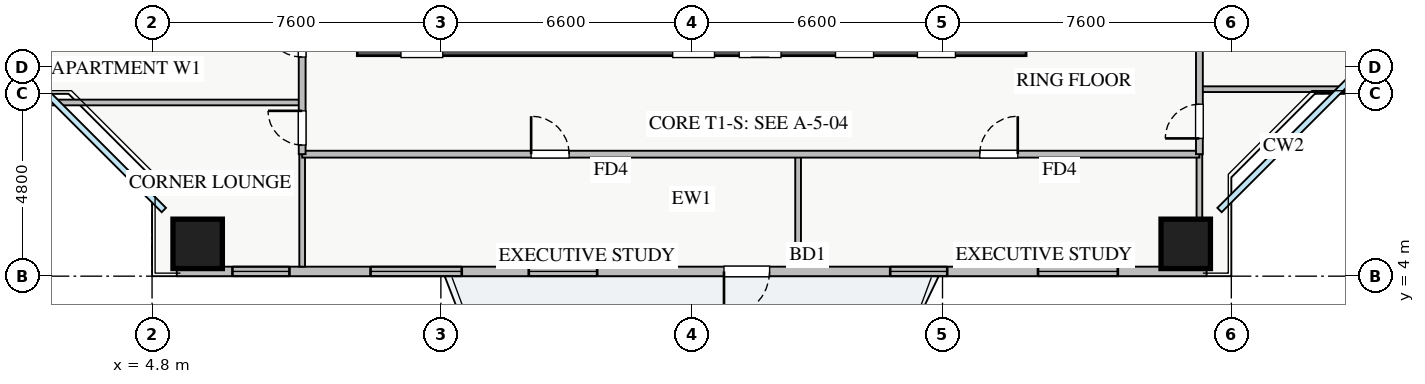
"""IFC4 building model, lengths in metres.
Left out: names, types, materials, properties, quantities, classifications, styles, units other than length and angle.
Written with IfcOpenShell. Run it as: python <this file> out.ifc"""

import sys

from ifc_helpers import new_model, si_unit, direction, frame, frame_2d, origin, origin_2d, place, context, subcontext, project, spatial, rectangle, extrude, source, transform, mapped, element, fill, save


model = new_model("IFC4")
c1 = context("Model", 3, precision=1e-05, world=origin(), true_north=direction((0.0, 1.0)))
c2 = subcontext(c1, "Body", "Model", "MODEL_VIEW")
j1 = project(units=[si_unit("LENGTHUNIT", "METRE"), si_unit("PLANEANGLEUNIT", "RADIAN")], contexts=[c1])
p1 = place(None, origin())
s1 = spatial("IfcSite", under=j1, at=p1, CompositionType="ELEMENT")
p2 = place(p1, origin())
s2 = spatial("IfcBuilding", under=s1, at=p2, CompositionType="ELEMENT")
p3 = place(p2, frame((0.0, 0.0, 60.0)))
s3 = spatial("IfcBuildingStorey", under=s2, at=p3, CompositionType="ELEMENT", Elevation=60.0)
p4 = place(p3, frame((10.2, 10.2, 0.0), z_axis=(0.0, 0.0, 1.0), x_axis=(1.0, 0.0, 0.0)))
e1 = element("IfcWall", 1, at=p4, inside=s3, PredefinedType="SHEAR", context=c2, shape_type="SweptSolid", body=[
    extrude(rectangle(XDim=17.6, YDim=0.8, at=frame_2d((8.8, 0.0))), origin(), (0.0, 0.0, 1.0), 3.25),
])
p5 = place(p4, frame((1.15, 0.0, 0.0)))
e2 = element("IfcOpeningElement", 2, at=p5, cuts=e1, PredefinedType="OPENING", context=c2, shape_type="SweptSolid", body=[
    extrude(rectangle(XDim=1.1, YDim=2.05, at=frame_2d((0.55, 1.025))), frame((0.0, 0.41, 0.0), z_axis=(0.0, -1.0, 0.0), x_axis=(1.0, 0.0, 0.0)), (0.0, 0.0, 1.0), 0.82),
])
p6 = place(p4, frame((8.3, 0.0, 0.0)))
e3 = element("IfcOpeningElement", 3, at=p6, cuts=e1, PredefinedType="OPENING", context=c2, shape_type="SweptSolid", body=[
    extrude(rectangle(XDim=1.1, YDim=2.05, at=frame_2d((0.55, 1.025))), frame((0.0, 0.41, 0.0), z_axis=(0.0, -1.0, 0.0), x_axis=(1.0, 0.0, 0.0)), (0.0, 0.0, 1.0), 0.82),
])
p7 = place(p4, frame((10.05, 0.0, 0.0)))
e4 = element("IfcOpeningElement", 4, at=p7, cuts=e1, PredefinedType="OPENING", context=c2, shape_type="SweptSolid", body=[
    extrude(rectangle(XDim=1.1, YDim=2.05, at=frame_2d((0.55, 1.025))), frame((0.0, 0.41, 0.0), z_axis=(0.0, -1.0, 0.0), x_axis=(1.0, 0.0, 0.0)), (0.0, 0.0, 1.0), 0.82),
])
p8 = place(p4, frame((14.74, 0.0, 0.0)))
e5 = element("IfcOpeningElement", 5, at=p8, cuts=e1, PredefinedType="OPENING", context=c2, shape_type="SweptSolid", body=[
    extrude(rectangle(XDim=1.0, YDim=2.05, at=frame_2d((0.5, 1.025))), frame((0.0, 0.41, 0.0), z_axis=(0.0, -1.0, 0.0), x_axis=(1.0, 0.0, 0.0)), (0.0, 0.0, 1.0), 0.82),
])
p9 = place(p4, frame((12.585, 0.0, 0.0)))
e6 = element("IfcOpeningElement", 6, at=p9, cuts=e1, PredefinedType="OPENING", context=c2, shape_type="SweptSolid", body=[
    extrude(rectangle(XDim=1.0, YDim=2.05, at=frame_2d((0.5, 1.025))), frame((0.0, 0.41, 0.0), z_axis=(0.0, -1.0, 0.0), x_axis=(1.0, 0.0, 0.0)), (0.0, 0.0, 1.0), 0.82),
])
m1 = source(origin(), c2, "Body", "SweptSolid", [
    extrude(rectangle(XDim=1.3, YDim=1.3, at=origin_2d()), origin(), (0.0, 0.0, 1.0), 3.25),
])
for number, where, z_axis, x_axis in (
    (7, (6.0, 4.85, 0.0), (0.0, 0.0, 1.0), (1.0, 0.0, 0.0)),
    (8, (32.0, 4.85, 0.0), (0.0, 0.0, 1.0), (1.0, 0.0, 0.0)),
):
    element("IfcColumn", number, at=place(p3, frame(where, z_axis=z_axis, x_axis=x_axis)), inside=s3, PredefinedType="COLUMN", context=c2, shape_type="MappedRepresentation", body=[
        mapped(m1, transform((0.0, 0.0, 0.0), x_axis=(1.0, 0.0, 0.0), y_axis=(0.0, 1.0, 0.0), z_axis=(0.0, 0.0, 1.0), scale=1.0)),
    ])
p10 = place(p3, frame((5.45, 4.125, 0.0), z_axis=(0.0, 0.0, 1.0), x_axis=(1.0, 0.0, 0.0)))
e9 = element("IfcWall", 9, at=p10, inside=s3, PredefinedType="STANDARD", context=c2, shape_type="SweptSolid", body=[
    extrude(rectangle(XDim=27.1, YDim=0.25, at=frame_2d((13.55, 0.0))), origin(), (0.0, 0.0, 1.0), 2.61),
])
p11 = place(p10, frame((14.4, 0.0, 0.0)))
e10 = element("IfcOpeningElement", 10, at=p11, cuts=e9, PredefinedType="OPENING", context=c2, shape_type="SweptSolid", body=[
    extrude(rectangle(XDim=1.2, YDim=2.1, at=frame_2d((0.6, 1.05))), frame((0.0, 0.135, 0.0), z_axis=(0.0, -1.0, 0.0), x_axis=(1.0, 0.0, 0.0)), (0.0, 0.0, 1.0), 0.27),
])
p12 = place(p10, frame((1.465, 0.0, 0.9)))
e11 = element("IfcOpeningElement", 11, at=p12, cuts=e9, PredefinedType="OPENING", context=c2, shape_type="SweptSolid", body=[
    extrude(rectangle(XDim=1.5, YDim=1.5, at=frame_2d((0.75, 0.75))), frame((0.0, 0.135, 0.0), z_axis=(0.0, -1.0, 0.0), x_axis=(1.0, 0.0, 0.0)), (0.0, 0.0, 1.0), 0.27),
])
p13 = place(p10, frame((9.263, 0.0, 0.9)))
e12 = element("IfcOpeningElement", 12, at=p13, cuts=e9, PredefinedType="OPENING", context=c2, shape_type="SweptSolid", body=[
    extrude(rectangle(XDim=1.8, YDim=1.45, at=frame_2d((0.9, 0.725))), frame((0.0, 0.135, 0.0), z_axis=(0.0, -1.0, 0.0), x_axis=(1.0, 0.0, 0.0)), (0.0, 0.0, 1.0), 0.27),
])
p14 = place(p10, frame((18.774, 0.0, 0.9)))
e13 = element("IfcOpeningElement", 13, at=p14, cuts=e9, PredefinedType="OPENING", context=c2, shape_type="SweptSolid", body=[
    extrude(rectangle(XDim=1.5, YDim=1.5, at=frame_2d((0.75, 0.75))), frame((0.0, 0.135, 0.0), z_axis=(0.0, -1.0, 0.0), x_axis=(1.0, 0.0, 0.0)), (0.0, 0.0, 1.0), 0.27),
])
p15 = place(p10, frame((22.663, 0.0, 0.9)))
e14 = element("IfcOpeningElement", 14, at=p15, cuts=e9, PredefinedType="OPENING", context=c2, shape_type="SweptSolid", body=[
    extrude(rectangle(XDim=2.1, YDim=1.48, at=frame_2d((1.05, 0.74))), frame((0.0, 0.135, 0.0), z_axis=(0.0, -1.0, 0.0), x_axis=(1.0, 0.0, 0.0)), (0.0, 0.0, 1.0), 0.27),
])
p16 = place(p10, frame((5.099, 0.0, 0.9)))
e15 = element("IfcOpeningElement", 15, at=p16, cuts=e9, PredefinedType="OPENING", context=c2, shape_type="SweptSolid", body=[
    extrude(rectangle(XDim=2.4, YDim=1.5, at=frame_2d((1.2, 0.75))), frame((0.0, 0.135, 0.0), z_axis=(0.0, -1.0, 0.0), x_axis=(1.0, 0.0, 0.0)), (0.0, 0.0, 1.0), 0.27),
])
for number, where, z_axis, x_axis in (
    (16, (21.8, 4.25, 0.0), (0.0, 0.0, 1.0), (0.0, 1.0, 0.0)),
    (17, (8.75, 4.25, 0.0), (0.0, 0.0, 1.0), (0.0, 1.0, 0.0)),
    (18, (32.36, 4.25, 0.0), (0.0, 0.0, 1.0), (0.0, 1.0, 0.0)),
):
    element("IfcWall", number, at=place(p3, frame(where, z_axis=z_axis, x_axis=x_axis)), inside=s3, PredefinedType="PARTITIONING", context=c2, shape_type="SweptSolid", body=[
        extrude(rectangle(XDim=2.96, YDim=0.15, at=frame_2d((1.48, 0.0))), origin(), (0.0, 0.0, 1.0), 3.07),
    ])
p17 = place(p3, frame((8.75, 7.21, 0.0), z_axis=(0.0, 0.0, 1.0), x_axis=(1.0, 0.0, 0.0)))
e19 = element("IfcWall", 19, at=p17, inside=s3, PredefinedType="PARTITIONING", context=c2, shape_type="SweptSolid", body=[
    extrude(rectangle(XDim=23.61, YDim=0.18, at=frame_2d((11.805, 0.0))), origin(), (0.0, 0.0, 1.0), 3.07),
])
p18 = place(p17, frame((6.025, 0.0, 0.0)))
e20 = element("IfcOpeningElement", 20, at=p18, cuts=e19, PredefinedType="OPENING", context=c2, shape_type="SweptSolid", body=[
    extrude(rectangle(XDim=1.0, YDim=2.05, at=frame_2d((0.5, 1.025))), frame((0.0, 0.1, 0.0), z_axis=(0.0, -1.0, 0.0), x_axis=(1.0, 0.0, 0.0)), (0.0, 0.0, 1.0), 0.2),
])
p19 = place(p17, frame((17.83, 0.0, 0.0)))
e21 = element("IfcOpeningElement", 21, at=p19, cuts=e19, PredefinedType="OPENING", context=c2, shape_type="SweptSolid", body=[
    extrude(rectangle(XDim=1.0, YDim=2.05, at=frame_2d((0.5, 1.025))), frame((0.0, 0.1, 0.0), z_axis=(0.0, -1.0, 0.0), x_axis=(1.0, 0.0, 0.0)), (0.0, 0.0, 1.0), 0.2),
])
p20 = place(p3, frame((0.25, 8.57, 0.0), z_axis=(0.0, 0.0, 1.0), x_axis=(1.0, 0.0, 0.0)))
e22 = element("IfcWall", 22, at=p20, inside=s3, PredefinedType="PARTITIONING", context=c2, shape_type="SweptSolid", body=[
    extrude(rectangle(XDim=8.5, YDim=0.15, at=frame_2d((4.25, 0.0))), origin(), (0.0, 0.0, 1.0), 3.07),
])
p21 = place(p3, frame((8.75, 7.21, 0.0), z_axis=(0.0, 0.0, 1.0), x_axis=(0.0, 1.0, 0.0)))
e23 = element("IfcWall", 23, at=p21, inside=s3, PredefinedType="PARTITIONING", context=c2, shape_type="SweptSolid", body=[
    extrude(rectangle(XDim=31.23, YDim=0.18, at=frame_2d((15.615, 0.0))), origin(), (0.0, 0.0, 1.0), 3.07),
])
p22 = place(p21, frame((30.09, 0.0, 0.0)))
e24 = element("IfcOpeningElement", 24, at=p22, cuts=e23, PredefinedType="OPENING", context=c2, shape_type="SweptSolid", body=[
    extrude(rectangle(XDim=0.9, YDim=2.05, at=frame_2d((0.45, 1.025))), frame((0.0, 0.1, 0.0), z_axis=(0.0, -1.0, 0.0), x_axis=(1.0, 0.0, 0.0)), (0.0, 0.0, 1.0), 0.2),
])
p23 = place(p21, frame((0.24, 0.0, 0.0)))
e25 = element("IfcOpeningElement", 25, at=p23, cuts=e23, PredefinedType="OPENING", context=c2, shape_type="SweptSolid", body=[
    extrude(rectangle(XDim=0.9, YDim=2.05, at=frame_2d((0.45, 1.025))), frame((0.0, 0.1, 0.0), z_axis=(0.0, -1.0, 0.0), x_axis=(1.0, 0.0, 0.0)), (0.0, 0.0, 1.0), 0.2),
])
p24 = place(p21, frame((2.555, 0.0, 0.0)))
e26 = element("IfcOpeningElement", 26, at=p24, cuts=e23, PredefinedType="OPENING", context=c2, shape_type="SweptSolid", body=[
    extrude(rectangle(XDim=1.0, YDim=2.05, at=frame_2d((0.5, 1.025))), frame((0.0, 0.1, 0.0), z_axis=(0.0, -1.0, 0.0), x_axis=(1.0, 0.0, 0.0)), (0.0, 0.0, 1.0), 0.2),
])
p25 = place(p21, frame((11.91, 0.0, 0.0)))
e27 = element("IfcOpeningElement", 27, at=p25, cuts=e23, PredefinedType="OPENING", context=c2, shape_type="SweptSolid", body=[
    extrude(rectangle(XDim=1.0, YDim=2.05, at=frame_2d((0.5, 1.025))), frame((0.0, 0.1, 0.0), z_axis=(0.0, -1.0, 0.0), x_axis=(1.0, 0.0, 0.0)), (0.0, 0.0, 1.0), 0.2),
])
p26 = place(p21, frame((17.425, 0.0, 0.0)))
e28 = element("IfcOpeningElement", 28, at=p26, cuts=e23, PredefinedType="OPENING", context=c2, shape_type="SweptSolid", body=[
    extrude(rectangle(XDim=1.0, YDim=2.05, at=frame_2d((0.5, 1.025))), frame((0.0, 0.1, 0.0), z_axis=(0.0, -1.0, 0.0), x_axis=(1.0, 0.0, 0.0)), (0.0, 0.0, 1.0), 0.2),
])
p27 = place(p21, frame((23.76, 0.0, 0.0)))
e29 = element("IfcOpeningElement", 29, at=p27, cuts=e23, PredefinedType="OPENING", context=c2, shape_type="SweptSolid", body=[
    extrude(rectangle(XDim=1.0, YDim=2.05, at=frame_2d((0.5, 1.025))), frame((0.0, 0.1, 0.0), z_axis=(0.0, -1.0, 0.0), x_axis=(1.0, 0.0, 0.0)), (0.0, 0.0, 1.0), 0.2),
])
p28 = place(p3, frame((32.36, 8.92, 0.0), z_axis=(0.0, 0.0, 1.0), x_axis=(1.0, 0.0, 0.0)))
e30 = element("IfcWall", 30, at=p28, inside=s3, PredefinedType="PARTITIONING", context=c2, shape_type="SweptSolid", body=[
    extrude(rectangle(XDim=5.39, YDim=0.15, at=frame_2d((2.695, 0.0))), origin(), (0.0, 0.0, 1.0), 3.07),
])
p29 = place(p3, frame((32.36, 7.21, 0.0), z_axis=(0.0, 0.0, 1.0), x_axis=(0.0, 1.0, 0.0)))
e31 = element("IfcWall", 31, at=p29, inside=s3, PredefinedType="PARTITIONING", context=c2, shape_type="SweptSolid", body=[
    extrude(rectangle(XDim=31.23, YDim=0.18, at=frame_2d((15.615, 0.0))), origin(), (0.0, 0.0, 1.0), 2.821),
])
p30 = place(p29, frame((30.09, 0.0, 0.0)))
e32 = element("IfcOpeningElement", 32, at=p30, cuts=e31, PredefinedType="OPENING", context=c2, shape_type="SweptSolid", body=[
    extrude(rectangle(XDim=0.9, YDim=2.05, at=frame_2d((0.45, 1.025))), frame((0.0, 0.1, 0.0), z_axis=(0.0, -1.0, 0.0), x_axis=(1.0, 0.0, 0.0)), (0.0, 0.0, 1.0), 0.2),
])
p31 = place(p29, frame((0.415, 0.0, 0.0)))
e33 = element("IfcOpeningElement", 33, at=p31, cuts=e31, PredefinedType="OPENING", context=c2, shape_type="SweptSolid", body=[
    extrude(rectangle(XDim=0.9, YDim=2.05, at=frame_2d((0.45, 1.025))), frame((0.0, 0.1, 0.0), z_axis=(0.0, -1.0, 0.0), x_axis=(1.0, 0.0, 0.0)), (0.0, 0.0, 1.0), 0.2),
])
p32 = place(p29, frame((7.975, 0.0, 0.0)))
e34 = element("IfcOpeningElement", 34, at=p32, cuts=e31, PredefinedType="OPENING", context=c2, shape_type="SweptSolid", body=[
    extrude(rectangle(XDim=1.0, YDim=2.05, at=frame_2d((0.5, 1.025))), frame((0.0, 0.1, 0.0), z_axis=(0.0, -1.0, 0.0), x_axis=(1.0, 0.0, 0.0)), (0.0, 0.0, 1.0), 0.2),
])
p33 = place(p29, frame((18.5, 0.0, 0.0)))
e35 = element("IfcOpeningElement", 35, at=p33, cuts=e31, PredefinedType="OPENING", context=c2, shape_type="SweptSolid", body=[
    extrude(rectangle(XDim=1.0, YDim=2.05, at=frame_2d((0.5, 1.025))), frame((0.0, 0.1, 0.0), z_axis=(0.0, -1.0, 0.0), x_axis=(1.0, 0.0, 0.0)), (0.0, 0.0, 1.0), 0.2),
])
m2 = source(origin(), c2, "Body", "SweptSolid", [
    extrude(rectangle(XDim=1.2, YDim=2.1, at=frame_2d((0.6, 1.05))), frame((0.0, 0.025, 0.0), z_axis=(0.0, -1.0, 0.0), x_axis=(1.0, 0.0, 0.0)), (0.0, 0.0, 1.0), 0.05),
])
p34 = place(p11, frame((1.2, 0.0, 0.0), z_axis=(0.0, 0.0, 1.0), x_axis=(-1.0, 0.0, 0.0)))
e36 = element("IfcDoor", 36, at=p34, inside=s3, OperationType="SINGLE_SWING_LEFT", PredefinedType="DOOR", context=c2, shape_type="MappedRepresentation", body=[
    mapped(m2, transform((0.0, 0.0, 0.0), x_axis=(1.0, 0.0, 0.0), y_axis=(0.0, 1.0, 0.0), z_axis=(0.0, 0.0, 1.0), scale=1.0)),
])
fill(e10, e36)
m3 = source(origin(), c2, "Body", "SweptSolid", [
    extrude(rectangle(XDim=1.5, YDim=1.5, at=frame_2d((0.75, 0.75))), frame((0.0, 0.03, 0.0), z_axis=(0.0, -1.0, 0.0), x_axis=(1.0, 0.0, 0.0)), (0.0, 0.0, 1.0), 0.06),
])
p35 = place(p12, origin())
e37 = element("IfcWindow", 37, at=p35, inside=s3, PartitioningType="TRIPLE_PANEL_VERTICAL", PredefinedType="WINDOW", context=c2, shape_type="MappedRepresentation", body=[
    mapped(m3, transform((0.0, 0.0, 0.0), x_axis=(1.0, 0.0, 0.0), y_axis=(0.0, 1.0, 0.0), z_axis=(0.0, 0.0, 1.0), scale=1.0)),
])
fill(e11, e37)
m4 = source(origin(), c2, "Body", "SweptSolid", [
    extrude(rectangle(XDim=1.8, YDim=1.45, at=frame_2d((0.9, 0.725))), frame((0.0, 0.03, 0.0), z_axis=(0.0, -1.0, 0.0), x_axis=(1.0, 0.0, 0.0)), (0.0, 0.0, 1.0), 0.06),
])
p36 = place(p13, origin())
e38 = element("IfcWindow", 38, at=p36, inside=s3, PartitioningType="DOUBLE_PANEL_VERTICAL", PredefinedType="WINDOW", context=c2, shape_type="MappedRepresentation", body=[
    mapped(m4, transform((0.0, 0.0, 0.0), x_axis=(1.0, 0.0, 0.0), y_axis=(0.0, 1.0, 0.0), z_axis=(0.0, 0.0, 1.0), scale=1.0)),
])
fill(e12, e38)
p37 = place(p14, origin())
e39 = element("IfcWindow", 39, at=p37, inside=s3, PartitioningType="DOUBLE_PANEL_VERTICAL", PredefinedType="WINDOW", context=c2, shape_type="MappedRepresentation", body=[
    mapped(m3, transform((0.0, 0.0, 0.0), x_axis=(1.0, 0.0, 0.0), y_axis=(0.0, 1.0, 0.0), z_axis=(0.0, 0.0, 1.0), scale=1.0)),
])
fill(e13, e39)
m5 = source(origin(), c2, "Body", "SweptSolid", [
    extrude(rectangle(XDim=2.1, YDim=1.48, at=frame_2d((1.05, 0.74))), frame((0.0, 0.03, 0.0), z_axis=(0.0, -1.0, 0.0), x_axis=(1.0, 0.0, 0.0)), (0.0, 0.0, 1.0), 0.06),
])
p38 = place(p15, origin())
e40 = element("IfcWindow", 40, at=p38, inside=s3, PartitioningType="TRIPLE_PANEL_VERTICAL", PredefinedType="WINDOW", context=c2, shape_type="MappedRepresentation", body=[
    mapped(m5, transform((0.0, 0.0, 0.0), x_axis=(1.0, 0.0, 0.0), y_axis=(0.0, 1.0, 0.0), z_axis=(0.0, 0.0, 1.0), scale=1.0)),
])
fill(e14, e40)
m6 = source(origin(), c2, "Body", "SweptSolid", [
    extrude(rectangle(XDim=1.0, YDim=2.05, at=frame_2d((0.5, 1.025))), frame((0.0, 0.025, 0.0), z_axis=(0.0, -1.0, 0.0), x_axis=(1.0, 0.0, 0.0)), (0.0, 0.0, 1.0), 0.05),
])
p39 = place(p18, origin())
e41 = element("IfcDoor", 41, at=p39, inside=s3, OperationType="SINGLE_SWING_LEFT", PredefinedType="DOOR", context=c2, shape_type="MappedRepresentation", body=[
    mapped(m6, transform((0.0, 0.0, 0.0), x_axis=(1.0, 0.0, 0.0), y_axis=(0.0, 1.0, 0.0), z_axis=(0.0, 0.0, 1.0), scale=1.0)),
])
fill(e20, e41)
p40 = place(p19, origin())
e42 = element("IfcDoor", 42, at=p40, inside=s3, OperationType="SINGLE_SWING_RIGHT", PredefinedType="DOOR", context=c2, shape_type="MappedRepresentation", body=[
    mapped(m6, transform((0.0, 0.0, 0.0), x_axis=(1.0, 0.0, 0.0), y_axis=(0.0, 1.0, 0.0), z_axis=(0.0, 0.0, 1.0), scale=1.0)),
])
fill(e21, e42)
m7 = source(origin(), c2, "Body", "SweptSolid", [
    extrude(rectangle(XDim=0.9, YDim=2.05, at=frame_2d((0.45, 1.025))), frame((0.0, 0.025, 0.0), z_axis=(0.0, -1.0, 0.0), x_axis=(1.0, 0.0, 0.0)), (0.0, 0.0, 1.0), 0.05),
])
p41 = place(p23, origin())
e43 = element("IfcDoor", 43, at=p41, inside=s3, OperationType="SINGLE_SWING_RIGHT", PredefinedType="DOOR", context=c2, shape_type="MappedRepresentation", body=[
    mapped(m7, transform((0.0, 0.0, 0.0), x_axis=(1.0, 0.0, 0.0), y_axis=(0.0, 1.0, 0.0), z_axis=(0.0, 0.0, 1.0), scale=1.0)),
])
fill(e25, e43)
p42 = place(p24, origin())
e44 = element("IfcDoor", 44, at=p42, inside=s3, OperationType="SINGLE_SWING_RIGHT", PredefinedType="DOOR", context=c2, shape_type="MappedRepresentation", body=[
    mapped(m6, transform((0.0, 0.0, 0.0), x_axis=(1.0, 0.0, 0.0), y_axis=(0.0, 1.0, 0.0), z_axis=(0.0, 0.0, 1.0), scale=1.0)),
])
fill(e26, e44)
p43 = place(p31, origin())
e45 = element("IfcDoor", 45, at=p43, inside=s3, OperationType="SINGLE_SWING_LEFT", PredefinedType="DOOR", context=c2, shape_type="MappedRepresentation", body=[
    mapped(m7, transform((0.0, 0.0, 0.0), x_axis=(1.0, 0.0, 0.0), y_axis=(0.0, 1.0, 0.0), z_axis=(0.0, 0.0, 1.0), scale=1.0)),
])
fill(e33, e45)
m8 = source(origin(), c2, "Body", "SweptSolid", [
    extrude(rectangle(XDim=2.4, YDim=1.5, at=frame_2d((1.2, 0.75))), frame((0.0, 0.03, 0.0), z_axis=(0.0, -1.0, 0.0), x_axis=(1.0, 0.0, 0.0)), (0.0, 0.0, 1.0), 0.06),
])
p44 = place(p16, origin())
e46 = element("IfcWindow", 46, at=p44, inside=s3, PartitioningType="TRIPLE_PANEL_VERTICAL", PredefinedType="WINDOW", context=c2, shape_type="MappedRepresentation", body=[
    mapped(m8, transform((0.0, 0.0, 0.0), x_axis=(1.0, 0.0, 0.0), y_axis=(0.0, 1.0, 0.0), z_axis=(0.0, 0.0, 1.0), scale=1.0)),
])
fill(e15, e46)
save(model, sys.argv[1])
